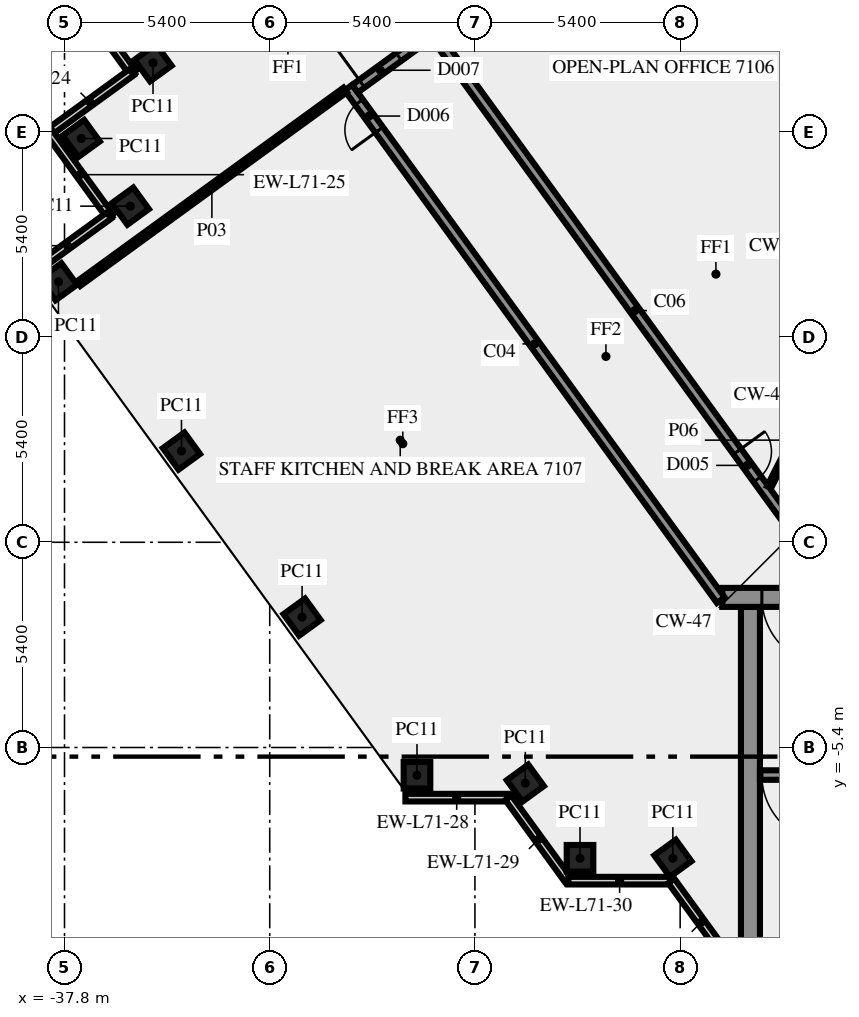
"""IFC4 building model, lengths in metres.
Left out: names, types, materials, properties, quantities, classifications, styles, units other than length and angle.
Written with IfcOpenShell. Run it as: python <this file> out.ifc"""

import sys

from ifc_helpers import new_model, si_unit, direction, frame, frame_2d, origin, origin_2d, place, context, subcontext, project, spatial, rectangle, extrude, element, fill, save


model = new_model("IFC4")
c1 = context("Model", 3, precision=1e-05, world=origin(), true_north=direction((0.0, 1.0)))
c2 = subcontext(c1, "Body", "Model", "MODEL_VIEW")
j1 = project(units=[si_unit("LENGTHUNIT", "METRE"), si_unit("PLANEANGLEUNIT", "RADIAN")], contexts=[c1])
p1 = place(None, origin())
s1 = spatial("IfcSite", under=j1, at=p1, CompositionType="ELEMENT")
p2 = place(p1, origin())
s2 = spatial("IfcBuilding", under=s1, at=p2, CompositionType="ELEMENT")
p3 = place(p2, frame((0.0, 0.0, 307.0)))
s3 = spatial("IfcBuildingStorey", under=s2, at=p3, CompositionType="ELEMENT", Elevation=307.0)
for number, where, z_axis, x_axis in (
    (1, (-35.471, 12.616, 0.0), (0.0, 0.0, 1.0), (-0.809, -0.588, 0.0)),
    (2, (-37.36, 10.625, 0.0), (0.0, 0.0, 1.0), (0.588, -0.809, 0.0)),
    (3, (-36.068, 8.844, 0.0), (0.0, 0.0, 1.0), (0.588, -0.809, 0.0)),
    (4, (-37.96, 6.855, 0.0), (0.0, 0.0, 1.0), (0.588, -0.809, 0.0)),
    (5, (-34.722, 2.4, 0.0), (0.0, 0.0, 1.0), (0.588, -0.809, 0.0)),
    (6, (-31.548, -1.969, 0.0), (0.0, 0.0, 1.0), (0.588, -0.809, 0.0)),
    (7, (-28.525, -6.13, 0.0), (0.0, 0.0, 1.0), (1.0, 0.0, 0.0)),
    (8, (-25.674, -6.337, 0.0), (0.0, 0.0, 1.0), (0.588, -0.809, 0.0)),
    (9, (-24.235, -8.315, 0.0), (0.0, 0.0, 1.0), (1.0, 0.0, 0.0)),
    (10, (-21.792, -8.315, 0.0), (0.0, 0.0, 1.0), (0.588, -0.809, 0.0)),
):
    element("IfcColumn", number, at=place(p3, frame(where, z_axis=z_axis, x_axis=x_axis)), inside=s3, PredefinedType="COLUMN", context=c2, shape_type="SweptSolid", body=[
        extrude(rectangle(XDim=0.7, YDim=0.7, at=origin_2d()), origin(), (0.0, 0.0, 1.0), 3.65),
    ])
for number, where, z_axis, x_axis in (
    (11, (-37.592, 14.536, 0.0), (0.0, 0.0, 1.0), (0.588, -0.809, 0.0)),
    (12, (-36.032, 12.369, 0.0), (0.0, 0.0, 1.0), (-0.809, -0.588, 0.0)),
    (13, (-38.189, 10.765, 0.0), (0.0, 0.0, 1.0), (0.588, -0.809, 0.0)),
    (14, (-36.629, 8.597, 0.0), (0.0, 0.0, 1.0), (-0.809, -0.588, 0.0)),
    (15, (-28.83, -6.719, 0.0), (0.0, 0.0, 1.0), (1.0, 0.0, 0.0)),
):
    element("IfcWall", number, at=place(p3, frame(where, z_axis=z_axis, x_axis=x_axis)), inside=s3, PredefinedType="SOLIDWALL", context=c2, shape_type="SweptSolid", body=[
        extrude(rectangle(XDim=2.7, YDim=0.2, at=frame_2d((1.35, 0.0))), origin(), (0.0, 0.0, 1.0), 3.65),
    ])
p4 = place(p3, frame((-26.12, -6.724, 0.0), z_axis=(0.0, 0.0, 1.0), x_axis=(0.587720002413, -0.809064397168, 0.0)))
e16 = element("IfcWall", 16, at=p4, inside=s3, PredefinedType="SOLIDWALL", context=c2, shape_type="SweptSolid", body=[
    extrude(rectangle(XDim=2.7, YDim=0.2, at=frame_2d((1.35, 0.0))), origin(), (0.0, 0.0, 1.0), 3.65),
])
p5 = place(p3, frame((-24.543, -8.904, 0.0), z_axis=(0.0, 0.0, 1.0), x_axis=(1.0, 0.0, 0.0)))
e17 = element("IfcWall", 17, at=p5, inside=s3, PredefinedType="SOLIDWALL", context=c2, shape_type="SweptSolid", body=[
    extrude(rectangle(XDim=2.7, YDim=0.2, at=frame_2d((1.35, 0.0))), origin(), (0.0, 0.0, 1.0), 3.65),
])
p6 = place(p3, frame((-21.833, -8.909, 0.0), z_axis=(0.0, 0.0, 1.0), x_axis=(0.587766567315, -0.809030569476, 0.0)))
e18 = element("IfcWall", 18, at=p6, inside=s3, PredefinedType="SOLIDWALL", context=c2, shape_type="SweptSolid", body=[
    extrude(rectangle(XDim=2.688, YDim=0.2, at=frame_2d((1.344, 0.0))), origin(), (0.0, 0.0, 1.0), 3.65),
])
p7 = place(p3, frame((-19.75, -10.5, 0.0), z_axis=(0.0, 0.0, 1.0), x_axis=(0.0, 1.0, 0.0)))
e19 = element("IfcWall", 19, at=p7, inside=s3, PredefinedType="SHEAR", context=c2, shape_type="SweptSolid", body=[
    extrude(rectangle(XDim=8.8, YDim=0.5, at=frame_2d((4.4, 0.0))), origin(), (0.0, 0.0, 1.0), 3.65),
])
p8 = place(p3, frame((-11.45, -6.125, 0.0), z_axis=(0.0, 0.0, 1.0), x_axis=(-1.0, 0.0, 0.0)))
e20 = element("IfcWall", 20, at=p8, inside=s3, PredefinedType="SHEAR", context=c2, shape_type="SweptSolid", body=[
    extrude(rectangle(XDim=8.05, YDim=0.25, at=frame_2d((4.025, 0.0))), origin(), (0.0, 0.0, 1.0), 3.65),
])
p9 = place(p8, frame((6.2, 0.0, 0.0)))
e21 = element("IfcOpeningElement", 21, at=p9, cuts=e20, PredefinedType="OPENING", context=c2, shape_type="SweptSolid", body=[
    extrude(rectangle(XDim=1.8, YDim=2.1, at=frame_2d((0.9, 1.05))), frame((0.0, 0.135, 0.0), z_axis=(0.0, -1.0, 0.0), x_axis=(1.0, 0.0, 0.0)), (0.0, 0.0, 1.0), 0.27),
])
p10 = place(p3, frame((20.49, -1.45, 0.0), z_axis=(0.0, 0.0, 1.0), x_axis=(-1.0, 0.0, 0.0)))
e22 = element("IfcWall", 22, at=p10, inside=s3, PredefinedType="SHEAR", context=c2, shape_type="SweptSolid", body=[
    extrude(rectangle(XDim=40.98, YDim=0.5, at=frame_2d((20.49, 0.0))), origin(), (0.0, 0.0, 1.0), 3.65),
])
p11 = place(p10, frame((38.14, 0.0, 0.0)))
e23 = element("IfcOpeningElement", 23, at=p11, cuts=e22, PredefinedType="OPENING", context=c2, shape_type="SweptSolid", body=[
    extrude(rectangle(XDim=1.8, YDim=2.1, at=frame_2d((0.9, 1.05))), frame((0.0, 0.26, 0.0), z_axis=(0.0, -1.0, 0.0), x_axis=(1.0, 0.0, 0.0)), (0.0, 0.0, 1.0), 0.52),
])
p12 = place(p10, frame((35.89, 0.0, 0.0)))
e24 = element("IfcOpeningElement", 24, at=p12, cuts=e22, PredefinedType="OPENING", context=c2, shape_type="SweptSolid", body=[
    extrude(rectangle(XDim=0.9, YDim=2.1, at=frame_2d((0.45, 1.05))), frame((0.0, 0.26, 0.0), z_axis=(0.0, -1.0, 0.0), x_axis=(1.0, 0.0, 0.0)), (0.0, 0.0, 1.0), 0.52),
])
p13 = place(p10, frame((32.94, 0.0, 0.0)))
e25 = element("IfcOpeningElement", 25, at=p13, cuts=e22, PredefinedType="OPENING", context=c2, shape_type="SweptSolid", body=[
    extrude(rectangle(XDim=0.9, YDim=2.1, at=frame_2d((0.45, 1.05))), frame((0.0, 0.26, 0.0), z_axis=(0.0, -1.0, 0.0), x_axis=(1.0, 0.0, 0.0)), (0.0, 0.0, 1.0), 0.52),
])
p14 = place(p10, frame((31.015, 0.0, 0.0)))
e26 = element("IfcOpeningElement", 26, at=p14, cuts=e22, PredefinedType="OPENING", context=c2, shape_type="SweptSolid", body=[
    extrude(rectangle(XDim=0.8, YDim=2.1, at=frame_2d((0.4, 1.05))), frame((0.0, 0.26, 0.0), z_axis=(0.0, -1.0, 0.0), x_axis=(1.0, 0.0, 0.0)), (0.0, 0.0, 1.0), 0.52),
])
p15 = place(p10, frame((24.765, 0.0, 0.0)))
e27 = element("IfcOpeningElement", 27, at=p15, cuts=e22, PredefinedType="OPENING", context=c2, shape_type="SweptSolid", body=[
    extrude(rectangle(XDim=0.8, YDim=2.1, at=frame_2d((0.4, 1.05))), frame((0.0, 0.26, 0.0), z_axis=(0.0, -1.0, 0.0), x_axis=(1.0, 0.0, 0.0)), (0.0, 0.0, 1.0), 0.52),
])
p16 = place(p10, frame((21.765, 0.0, 0.0)))
e28 = element("IfcOpeningElement", 28, at=p16, cuts=e22, PredefinedType="OPENING", context=c2, shape_type="SweptSolid", body=[
    extrude(rectangle(XDim=2.0, YDim=2.1, at=frame_2d((1.0, 1.05))), frame((0.0, 0.26, 0.0), z_axis=(0.0, -1.0, 0.0), x_axis=(1.0, 0.0, 0.0)), (0.0, 0.0, 1.0), 0.52),
])
p17 = place(p10, frame((12.24, 0.0, 0.0)))
e29 = element("IfcOpeningElement", 29, at=p17, cuts=e22, PredefinedType="OPENING", context=c2, shape_type="SweptSolid", body=[
    extrude(rectangle(XDim=0.9, YDim=2.1, at=frame_2d((0.45, 1.05))), frame((0.0, 0.26, 0.0), z_axis=(0.0, -1.0, 0.0), x_axis=(1.0, 0.0, 0.0)), (0.0, 0.0, 1.0), 0.52),
])
p18 = place(p10, frame((7.14, 0.0, 0.0)))
e30 = element("IfcOpeningElement", 30, at=p18, cuts=e22, PredefinedType="OPENING", context=c2, shape_type="SweptSolid", body=[
    extrude(rectangle(XDim=0.9, YDim=2.1, at=frame_2d((0.45, 1.05))), frame((0.0, 0.26, 0.0), z_axis=(0.0, -1.0, 0.0), x_axis=(1.0, 0.0, 0.0)), (0.0, 0.0, 1.0), 0.52),
])
p19 = place(p10, frame((5.028, 0.0, 0.0)))
e31 = element("IfcOpeningElement", 31, at=p19, cuts=e22, PredefinedType="OPENING", context=c2, shape_type="SweptSolid", body=[
    extrude(rectangle(XDim=0.8, YDim=2.1, at=frame_2d((0.4, 1.05))), frame((0.0, 0.26, 0.0), z_axis=(0.0, -1.0, 0.0), x_axis=(1.0, 0.0, 0.0)), (0.0, 0.0, 1.0), 0.52),
])
p20 = place(p10, frame((3.452, 0.0, 0.0)))
e32 = element("IfcOpeningElement", 32, at=p20, cuts=e22, PredefinedType="OPENING", context=c2, shape_type="SweptSolid", body=[
    extrude(rectangle(XDim=0.8, YDim=2.1, at=frame_2d((0.4, 1.05))), frame((0.0, 0.26, 0.0), z_axis=(0.0, -1.0, 0.0), x_axis=(1.0, 0.0, 0.0)), (0.0, 0.0, 1.0), 0.52),
])
p21 = place(p10, frame((1.04, 0.0, 0.0)))
e33 = element("IfcOpeningElement", 33, at=p21, cuts=e22, PredefinedType="OPENING", context=c2, shape_type="SweptSolid", body=[
    extrude(rectangle(XDim=1.8, YDim=2.1, at=frame_2d((0.9, 1.05))), frame((0.0, 0.26, 0.0), z_axis=(0.0, -1.0, 0.0), x_axis=(1.0, 0.0, 0.0)), (0.0, 0.0, 1.0), 0.52),
])
p22 = place(p3, frame((-20.531, -1.523, 0.0), z_axis=(0.0, 0.0, 1.0), x_axis=(-0.587785867777, 0.809016547199, 0.0)))
e34 = element("IfcWall", 34, at=p22, inside=s3, PredefinedType="SOLIDWALL", context=c2, shape_type="SweptSolid", body=[
    extrude(rectangle(XDim=16.67, YDim=0.25, at=frame_2d((8.335, 0.0))), origin(), (0.0, 0.0, 1.0), 3.65),
])
p23 = place(p22, frame((15.296, 0.0, 0.0)))
e35 = element("IfcOpeningElement", 35, at=p23, cuts=e34, PredefinedType="OPENING", context=c2, shape_type="SweptSolid", body=[
    extrude(rectangle(XDim=0.9, YDim=2.1, at=frame_2d((0.45, 1.05))), frame((0.0, 0.135, 0.0), z_axis=(0.0, -1.0, 0.0), x_axis=(1.0, 0.0, 0.0)), (0.0, 0.0, 1.0), 0.27),
])
p24 = place(p3, frame((-30.155, 11.936, 0.0), z_axis=(0.0, 0.0, 1.0), x_axis=(0.809038743598, 0.587755315891, 0.0)))
e36 = element("IfcWall", 36, at=p24, inside=s3, PredefinedType="SOLIDWALL", context=c2, shape_type="SweptSolid", body=[
    extrude(rectangle(XDim=2.65, YDim=0.25, at=frame_2d((1.325, 0.0))), origin(), (0.0, 0.0, 1.0), 3.65),
])
p25 = place(p24, frame((0.225, 0.0, 0.0)))
e37 = element("IfcOpeningElement", 37, at=p25, cuts=e36, PredefinedType="OPENING", context=c2, shape_type="SweptSolid", body=[
    extrude(rectangle(XDim=1.2, YDim=2.1, at=frame_2d((0.6, 1.05))), frame((0.0, 0.135, 0.0), z_axis=(0.0, -1.0, 0.0), x_axis=(1.0, 0.0, 0.0)), (0.0, 0.0, 1.0), 0.27),
])
p26 = place(p3, frame((-28.039, 13.319, 0.0), z_axis=(0.0, 0.0, 1.0), x_axis=(0.587791911753, -0.809012155952, 0.0)))
e38 = element("IfcWall", 38, at=p26, inside=s3, PredefinedType="SOLIDWALL", context=c2, shape_type="SweptSolid", body=[
    extrude(rectangle(XDim=17.853, YDim=0.25, at=frame_2d((8.927, 0.0))), origin(), (0.0, 0.0, 1.0), 3.65),
])
p27 = place(p26, frame((13.512, 0.0, 0.0)))
e39 = element("IfcOpeningElement", 39, at=p27, cuts=e38, PredefinedType="OPENING", context=c2, shape_type="SweptSolid", body=[
    extrude(rectangle(XDim=0.9, YDim=2.1, at=frame_2d((0.45, 1.05))), frame((0.0, 0.135, 0.0), z_axis=(0.0, -1.0, 0.0), x_axis=(1.0, 0.0, 0.0)), (0.0, 0.0, 1.0), 0.27),
])
p28 = place(p3, frame((-37.429, 6.805, 0.0), z_axis=(0.0, 0.0, 1.0), x_axis=(0.809020922653, 0.587779845444, 0.0)))
e40 = element("IfcWall", 40, at=p28, inside=s3, PredefinedType="PARTITIONING", context=c2, shape_type="SweptSolid", body=[
    extrude(rectangle(XDim=8.67, YDim=0.15, at=frame_2d((4.335, 0.0))), origin(), (0.0, 0.0, 1.0), 3.65),
])
p29 = place(p3, frame((-19.261, 1.45, 0.0), z_axis=(0.0, 0.0, 1.0), x_axis=(0.453950796792, 0.891026752736, 0.0)))
e41 = element("IfcWall", 41, at=p29, inside=s3, PredefinedType="PARTITIONING", context=c2, shape_type="SweptSolid", body=[
    extrude(rectangle(XDim=2.778, YDim=0.12, at=frame_2d((1.389, 0.0))), origin(), (0.0, 0.0, 1.0), 3.65),
])
p30 = place(p9, origin())
e42 = element("IfcDoor", 42, at=p30, inside=s3, OperationType="DOUBLE_DOOR_SINGLE_SWING", PredefinedType="DOOR", context=c2, shape_type="SweptSolid", body=[
    extrude(rectangle(XDim=1.8, YDim=2.1, at=frame_2d((0.9, 1.05))), frame((0.0, 0.025, 0.0), z_axis=(0.0, -1.0, 0.0), x_axis=(1.0, 0.0, 0.0)), (0.0, 0.0, 1.0), 0.05),
])
fill(e21, e42)
p31 = place(p11, origin())
e43 = element("IfcDoor", 43, at=p31, inside=s3, OperationType="DOUBLE_DOOR_SINGLE_SWING", PredefinedType="DOOR", context=c2, shape_type="SweptSolid", body=[
    extrude(rectangle(XDim=1.8, YDim=2.1, at=frame_2d((0.9, 1.05))), frame((0.0, 0.025, 0.0), z_axis=(0.0, -1.0, 0.0), x_axis=(1.0, 0.0, 0.0)), (0.0, 0.0, 1.0), 0.05),
])
fill(e23, e43)
p32 = place(p27, origin())
e44 = element("IfcDoor", 44, at=p32, inside=s3, OperationType="SINGLE_SWING_RIGHT", PredefinedType="DOOR", context=c2, shape_type="SweptSolid", body=[
    extrude(rectangle(XDim=0.9, YDim=2.1, at=frame_2d((0.45, 1.05))), frame((0.0, 0.025, 0.0), z_axis=(0.0, -1.0, 0.0), x_axis=(1.0, 0.0, 0.0)), (0.0, 0.0, 1.0), 0.05),
])
fill(e39, e44)
p33 = place(p25, origin())
e45 = element("IfcDoor", 45, at=p33, inside=s3, OperationType="SINGLE_SWING_LEFT", PredefinedType="DOOR", context=c2, shape_type="SweptSolid", body=[
    extrude(rectangle(XDim=1.2, YDim=2.1, at=frame_2d((0.6, 1.05))), frame((0.0, 0.025, 0.0), z_axis=(0.0, -1.0, 0.0), x_axis=(1.0, 0.0, 0.0)), (0.0, 0.0, 1.0), 0.05),
])
fill(e37, e45)
p34 = place(p23, origin())
e46 = element("IfcDoor", 46, at=p34, inside=s3, OperationType="SINGLE_SWING_RIGHT", PredefinedType="DOOR", context=c2, shape_type="SweptSolid", body=[
    extrude(rectangle(XDim=0.9, YDim=2.1, at=frame_2d((0.45, 1.05))), frame((0.0, 0.025, 0.0), z_axis=(0.0, -1.0, 0.0), x_axis=(1.0, 0.0, 0.0)), (0.0, 0.0, 1.0), 0.05),
])
fill(e35, e46)
save(model, sys.argv[1])
